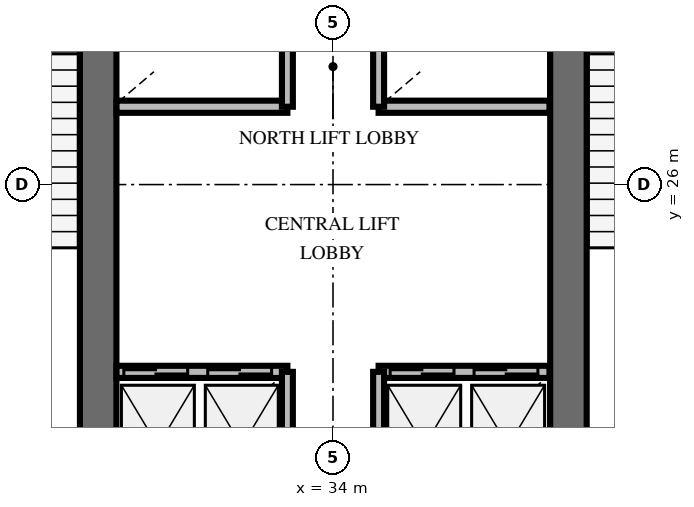
"""IFC4 building model, lengths in metres.
Left out: names, types, materials, properties, quantities, classifications, styles, units other than length and angle.
Written with IfcOpenShell. Run it as: python <this file> out.ifc"""

import sys

from ifc_helpers import new_model, si_unit, direction, frame, frame_2d, origin, place, context, subcontext, project, spatial, rectangle, extrude, element, fill, save


model = new_model("IFC4")
c1 = context("Model", 3, precision=1e-05, world=origin(), true_north=direction((0.0, 1.0)))
c2 = subcontext(c1, "Body", "Model", "MODEL_VIEW")
j1 = project(units=[si_unit("LENGTHUNIT", "METRE"), si_unit("PLANEANGLEUNIT", "RADIAN")], contexts=[c1])
p1 = place(None, origin())
s1 = spatial("IfcSite", under=j1, at=p1, CompositionType="ELEMENT")
p2 = place(p1, origin())
s2 = spatial("IfcBuilding", under=s1, at=p2, CompositionType="ELEMENT")
p3 = place(p2, frame((0.0, 0.0, 141.8)))
s3 = spatial("IfcBuildingStorey", under=s2, at=p3, CompositionType="ELEMENT", Elevation=141.8)
for number, where, z_axis, x_axis in (
    (1, (30.138, 20.187, 0.0), (0.0, 0.0, 1.0), (0.0, 1.0, 0.0)),
    (2, (37.872, 20.187, 0.0), (0.0, 0.0, 1.0), (0.0, 1.0, 0.0)),
):
    element("IfcWall", number, at=place(p3, frame(where, z_axis=z_axis, x_axis=x_axis)), inside=s3, PredefinedType="SHEAR", context=c2, shape_type="SweptSolid", body=[
        extrude(rectangle(XDim=9.826, YDim=0.6, at=frame_2d((4.913, 0.0))), origin(), (0.0, 0.0, 1.0), 4.0),
    ])
p4 = place(p3, frame((30.44, 22.92, 0.0), z_axis=(0.0, 0.0, 1.0), x_axis=(1.0, 0.0, 0.0)))
e3 = element("IfcWall", 3, at=p4, inside=s3, PredefinedType="SOLIDWALL", context=c2, shape_type="SweptSolid", body=[
    extrude(rectangle(XDim=2.81, YDim=0.2, at=frame_2d((1.405, 0.0))), origin(), (0.0, 0.0, 1.0), 2.8),
])
p5 = place(p4, frame((0.12, 0.0, 0.0)))
e4 = element("IfcOpeningElement", 4, at=p5, cuts=e3, PredefinedType="OPENING", context=c2, shape_type="SweptSolid", body=[
    extrude(rectangle(XDim=1.05, YDim=2.1, at=frame_2d((0.525, 1.05))), frame((0.0, 0.11, 0.0), z_axis=(0.0, -1.0, 0.0), x_axis=(1.0, 0.0, 0.0)), (0.0, 0.0, 1.0), 0.22),
])
p6 = place(p4, frame((1.5, 0.0, 0.0)))
e5 = element("IfcOpeningElement", 5, at=p6, cuts=e3, PredefinedType="OPENING", context=c2, shape_type="SweptSolid", body=[
    extrude(rectangle(XDim=1.05, YDim=2.1, at=frame_2d((0.525, 1.05))), frame((0.0, 0.11, 0.0), z_axis=(0.0, -1.0, 0.0), x_axis=(1.0, 0.0, 0.0)), (0.0, 0.0, 1.0), 0.22),
])
p7 = place(p3, frame((33.25, 20.5, 0.0), z_axis=(0.0, 0.0, 1.0), x_axis=(0.0, 1.0, 0.0)))
e6 = element("IfcWall", 6, at=p7, inside=s3, PredefinedType="SOLIDWALL", context=c2, shape_type="SweptSolid", body=[
    extrude(rectangle(XDim=2.42, YDim=0.18, at=frame_2d((1.21, 0.0))), origin(), (0.0, 0.0, 1.0), 2.8),
])
p8 = place(p3, frame((34.75, 22.92, 0.0), z_axis=(0.0, 0.0, 1.0), x_axis=(1.0, 0.0, 0.0)))
e7 = element("IfcWall", 7, at=p8, inside=s3, PredefinedType="SOLIDWALL", context=c2, shape_type="SweptSolid", body=[
    extrude(rectangle(XDim=2.81, YDim=0.2, at=frame_2d((1.405, 0.0))), origin(), (0.0, 0.0, 1.0), 2.8),
])
p9 = place(p8, frame((0.19, 0.0, 0.0)))
e8 = element("IfcOpeningElement", 8, at=p9, cuts=e7, PredefinedType="OPENING", context=c2, shape_type="SweptSolid", body=[
    extrude(rectangle(XDim=1.05, YDim=2.1, at=frame_2d((0.525, 1.05))), frame((0.0, 0.11, 0.0), z_axis=(0.0, -1.0, 0.0), x_axis=(1.0, 0.0, 0.0)), (0.0, 0.0, 1.0), 0.22),
])
p10 = place(p8, frame((1.57, 0.0, 0.0)))
e9 = element("IfcOpeningElement", 9, at=p10, cuts=e7, PredefinedType="OPENING", context=c2, shape_type="SweptSolid", body=[
    extrude(rectangle(XDim=1.05, YDim=2.1, at=frame_2d((0.525, 1.05))), frame((0.0, 0.11, 0.0), z_axis=(0.0, -1.0, 0.0), x_axis=(1.0, 0.0, 0.0)), (0.0, 0.0, 1.0), 0.22),
])
p11 = place(p3, frame((34.75, 20.5, 0.0), z_axis=(0.0, 0.0, 1.0), x_axis=(0.0, 1.0, 0.0)))
e10 = element("IfcWall", 10, at=p11, inside=s3, PredefinedType="SOLIDWALL", context=c2, shape_type="SweptSolid", body=[
    extrude(rectangle(XDim=2.42, YDim=0.18, at=frame_2d((1.21, 0.0))), origin(), (0.0, 0.0, 1.0), 2.8),
])
p12 = place(p3, frame((30.44, 27.28, 0.0), z_axis=(0.0, 0.0, 1.0), x_axis=(1.0, 0.0, 0.0)))
e11 = element("IfcWall", 11, at=p12, inside=s3, PredefinedType="SOLIDWALL", context=c2, shape_type="SweptSolid", body=[
    extrude(rectangle(XDim=2.81, YDim=0.2, at=frame_2d((1.405, 0.0))), origin(), (0.0, 0.0, 1.0), 2.8),
])
p13 = place(p3, frame((33.25, 27.28, 0.0), z_axis=(0.0, 0.0, 1.0), x_axis=(0.0, 1.0, 0.0)))
e12 = element("IfcWall", 12, at=p13, inside=s3, PredefinedType="SOLIDWALL", context=c2, shape_type="SweptSolid", body=[
    extrude(rectangle(XDim=2.47, YDim=0.18, at=frame_2d((1.235, 0.0))), origin(), (0.0, 0.0, 1.0), 2.8),
])
p14 = place(p3, frame((34.75, 27.28, 0.0), z_axis=(0.0, 0.0, 1.0), x_axis=(1.0, 0.0, 0.0)))
e13 = element("IfcWall", 13, at=p14, inside=s3, PredefinedType="SOLIDWALL", context=c2, shape_type="SweptSolid", body=[
    extrude(rectangle(XDim=2.81, YDim=0.2, at=frame_2d((1.405, 0.0))), origin(), (0.0, 0.0, 1.0), 2.8),
])
p15 = place(p3, frame((34.75, 27.28, 0.0), z_axis=(0.0, 0.0, 1.0), x_axis=(0.0, 1.0, 0.0)))
e14 = element("IfcWall", 14, at=p15, inside=s3, PredefinedType="SOLIDWALL", context=c2, shape_type="SweptSolid", body=[
    extrude(rectangle(XDim=2.47, YDim=0.18, at=frame_2d((1.235, 0.0))), origin(), (0.0, 0.0, 1.0), 2.8),
])
p16 = place(p5, origin())
e15 = element("IfcDoor", 15, at=p16, inside=s3, OperationType="DOUBLE_DOOR_SLIDING", PredefinedType="USERDEFINED", context=c2, shape_type="SweptSolid", body=[
    extrude(rectangle(XDim=1.05, YDim=2.1, at=frame_2d((0.525, 1.05))), frame((0.0, 0.025, 0.0), z_axis=(0.0, -1.0, 0.0), x_axis=(1.0, 0.0, 0.0)), (0.0, 0.0, 1.0), 0.05),
])
fill(e4, e15)
p17 = place(p6, origin())
e16 = element("IfcDoor", 16, at=p17, inside=s3, OperationType="DOUBLE_DOOR_SLIDING", PredefinedType="USERDEFINED", context=c2, shape_type="SweptSolid", body=[
    extrude(rectangle(XDim=1.05, YDim=2.1, at=frame_2d((0.525, 1.05))), frame((0.0, 0.025, 0.0), z_axis=(0.0, -1.0, 0.0), x_axis=(1.0, 0.0, 0.0)), (0.0, 0.0, 1.0), 0.05),
])
fill(e5, e16)
p18 = place(p9, origin())
e17 = element("IfcDoor", 17, at=p18, inside=s3, OperationType="DOUBLE_DOOR_SLIDING", PredefinedType="USERDEFINED", context=c2, shape_type="SweptSolid", body=[
    extrude(rectangle(XDim=1.05, YDim=2.1, at=frame_2d((0.525, 1.05))), frame((0.0, 0.025, 0.0), z_axis=(0.0, -1.0, 0.0), x_axis=(1.0, 0.0, 0.0)), (0.0, 0.0, 1.0), 0.05),
])
fill(e8, e17)
p19 = place(p10, origin())
e18 = element("IfcDoor", 18, at=p19, inside=s3, OperationType="DOUBLE_DOOR_SLIDING", PredefinedType="USERDEFINED", context=c2, shape_type="SweptSolid", body=[
    extrude(rectangle(XDim=1.05, YDim=2.1, at=frame_2d((0.525, 1.05))), frame((0.0, 0.025, 0.0), z_axis=(0.0, -1.0, 0.0), x_axis=(1.0, 0.0, 0.0)), (0.0, 0.0, 1.0), 0.05),
])
fill(e9, e18)
save(model, sys.argv[1])
